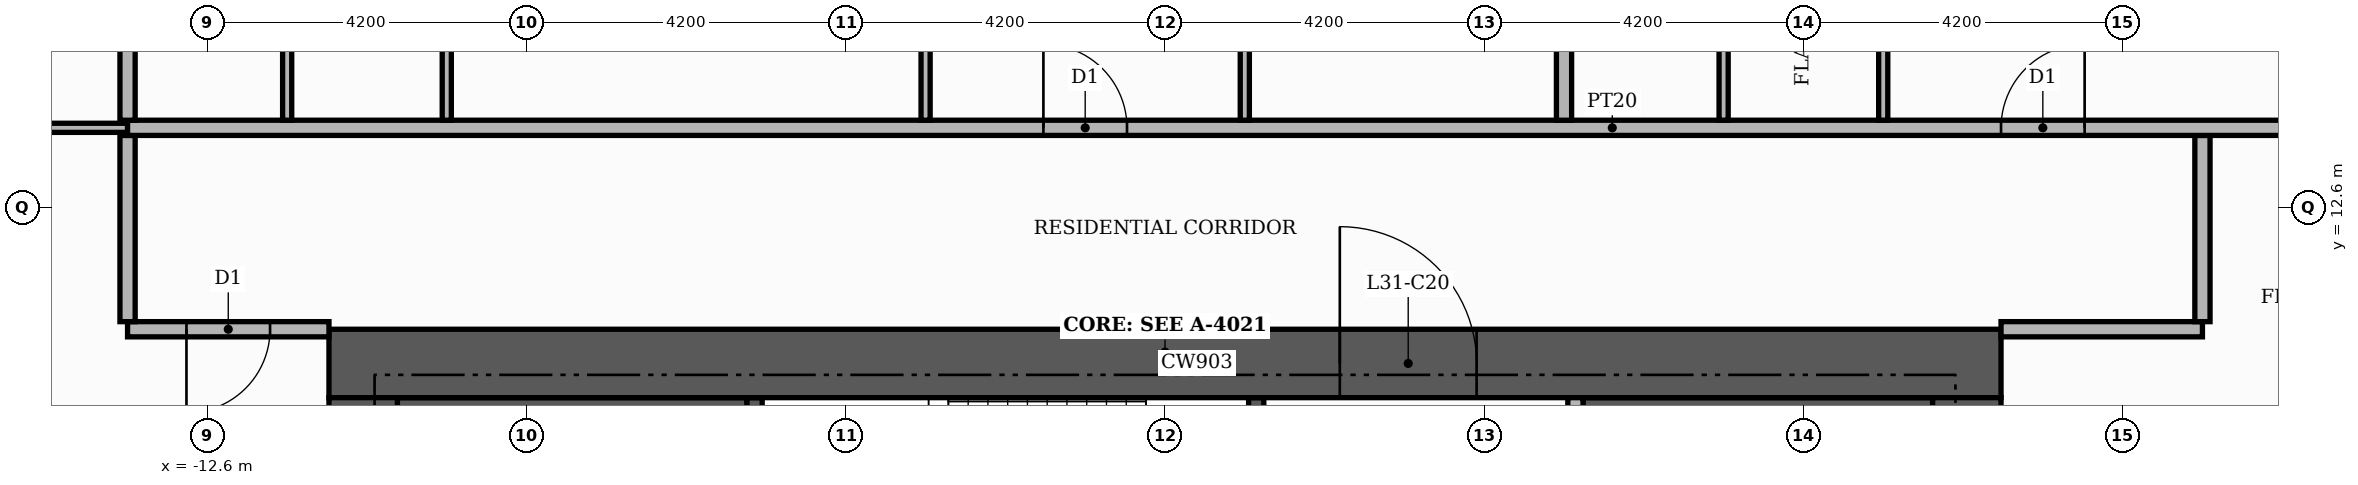
"""IFC4 building model, lengths in metres.
Left out: names, types, materials, properties, quantities, classifications, styles, units other than length and angle.
Written with IfcOpenShell. Run it as: python <this file> out.ifc"""

import sys

from ifc_helpers import new_model, si_unit, direction, frame, frame_2d, origin, place, context, subcontext, project, spatial, rectangle, extrude, element, fill, save


model = new_model("IFC4")
c1 = context("Model", 3, precision=1e-05, world=origin(), true_north=direction((0.0, 1.0)))
c2 = subcontext(c1, "Body", "Model", "MODEL_VIEW")
j1 = project(units=[si_unit("LENGTHUNIT", "METRE"), si_unit("PLANEANGLEUNIT", "RADIAN")], contexts=[c1])
p1 = place(None, origin())
s1 = spatial("IfcSite", under=j1, at=p1, CompositionType="ELEMENT")
p2 = place(p1, origin())
s2 = spatial("IfcBuilding", under=s1, at=p2, CompositionType="ELEMENT")
p3 = place(p2, frame((0.0, 0.0, 133.8)))
s3 = spatial("IfcBuildingStorey", under=s2, at=p3, CompositionType="ELEMENT", Elevation=133.8)
for number, where, z_axis, x_axis in (
    (1, (-10.1, 9.15, 0.0), (0.0, 0.0, 1.0), (1.0, 0.0, 0.0)),
    (2, (5.5, 9.15, 0.0), (0.0, 0.0, 1.0), (1.0, 0.0, 0.0)),
):
    element("IfcWall", number, at=place(p3, frame(where, z_axis=z_axis, x_axis=x_axis)), inside=s3, PredefinedType="SHEAR", context=c2, shape_type="SweptSolid", body=[
        extrude(rectangle(XDim=4.6, YDim=1.9, at=frame_2d((2.3, 0.0))), origin(), (0.0, 0.0, 1.0), 3.48),
    ])
p4 = place(p3, frame((-5.4, 7.25, 0.0), z_axis=(0.0, 0.0, 1.0), x_axis=(0.0, 1.0, 0.0)))
e3 = element("IfcWall", 3, at=p4, inside=s3, PredefinedType="SHEAR", context=c2, shape_type="SweptSolid", body=[
    extrude(rectangle(XDim=2.85, YDim=0.2, at=frame_2d((1.425, 0.0))), origin(), (0.0, 0.0, 1.0), 3.48),
])
p5 = place(p3, frame((1.2, 7.25, 0.0), z_axis=(0.0, 0.0, 1.0), x_axis=(0.0, 1.0, 0.0)))
e4 = element("IfcWall", 4, at=p5, inside=s3, PredefinedType="SHEAR", context=c2, shape_type="SweptSolid", body=[
    extrude(rectangle(XDim=2.85, YDim=0.2, at=frame_2d((1.425, 0.0))), origin(), (0.0, 0.0, 1.0), 3.48),
])
p6 = place(p5, frame((0.85, 0.0, 0.0)))
e5 = element("IfcOpeningElement", 5, at=p6, cuts=e4, PredefinedType="OPENING", context=c2, shape_type="SweptSolid", body=[
    extrude(rectangle(XDim=1.0, YDim=2.1, at=frame_2d((0.5, 1.05))), frame((0.0, 0.11, 0.0), z_axis=(0.0, -1.0, 0.0), x_axis=(1.0, 0.0, 0.0)), (0.0, 0.0, 1.0), 0.22),
])
p7 = place(p3, frame((-11.0, 10.55, 0.0), z_axis=(0.0, 0.0, 1.0), x_axis=(1.0, 0.0, 0.0)))
e6 = element("IfcWall", 6, at=p7, inside=s3, PredefinedType="SHEAR", context=c2, shape_type="SweptSolid", body=[
    extrude(rectangle(XDim=22.0, YDim=0.9, at=frame_2d((11.0, 0.0))), origin(), (0.0, 0.0, 1.0), 3.48),
])
p8 = place(p7, frame((13.3, 0.0, 0.0)))
e7 = element("IfcOpeningElement", 7, at=p8, cuts=e6, PredefinedType="OPENING", context=c2, shape_type="SweptSolid", body=[
    extrude(rectangle(XDim=1.8, YDim=2.2, at=frame_2d((0.9, 1.1))), frame((0.0, 0.46, 0.0), z_axis=(0.0, -1.0, 0.0), x_axis=(1.0, 0.0, 0.0)), (0.0, 0.0, 1.0), 0.92),
])
for number, where, z_axis, x_axis in (
    (8, (-10.55, -10.1, 0.0), (0.0, 0.0, 1.0), (0.0, 1.0, 0.0)),
    (9, (10.55, -10.1, 0.0), (0.0, 0.0, 1.0), (0.0, 1.0, 0.0)),
):
    element("IfcWall", number, at=place(p3, frame(where, z_axis=z_axis, x_axis=x_axis)), inside=s3, PredefinedType="SHEAR", context=c2, shape_type="SweptSolid", body=[
        extrude(rectangle(XDim=20.2, YDim=0.9, at=frame_2d((10.1, 0.0))), origin(), (0.0, 0.0, 1.0), 3.48),
    ])
p9 = place(p3, frame((5.4, 5.5, 0.0), z_axis=(0.0, 0.0, 1.0), x_axis=(0.0, 1.0, 0.0)))
e10 = element("IfcWall", 10, at=p9, inside=s3, PredefinedType="PARTITIONING", context=c2, shape_type="SweptSolid", body=[
    extrude(rectangle(XDim=4.6, YDim=0.2, at=frame_2d((2.3, 0.0))), origin(), (0.0, 0.0, 1.0), 3.48),
])
p10 = place(p9, frame((0.25, 0.0, 0.0)))
e11 = element("IfcOpeningElement", 11, at=p10, cuts=e10, PredefinedType="OPENING", context=c2, shape_type="SweptSolid", body=[
    extrude(rectangle(XDim=1.0, YDim=2.1, at=frame_2d((0.5, 1.05))), frame((0.0, 0.11, 0.0), z_axis=(0.0, -1.0, 0.0), x_axis=(1.0, 0.0, 0.0)), (0.0, 0.0, 1.0), 0.22),
])
p11 = place(p3, frame((-13.65, 11.0, 0.0), z_axis=(0.0, 0.0, 1.0), x_axis=(1.0, 0.0, 0.0)))
e12 = element("IfcWall", 12, at=p11, inside=s3, PredefinedType="PARTITIONING", context=c2, shape_type="SweptSolid", body=[
    extrude(rectangle(XDim=2.65, YDim=0.2, at=frame_2d((1.325, 0.0))), origin(), (0.0, 0.0, 1.0), 3.48),
])
p12 = place(p11, frame((0.775, 0.0, 0.0)))
e13 = element("IfcOpeningElement", 13, at=p12, cuts=e12, PredefinedType="OPENING", context=c2, shape_type="SweptSolid", body=[
    extrude(rectangle(XDim=1.1, YDim=2.4, at=frame_2d((0.55, 1.2))), frame((0.0, 0.11, 0.0), z_axis=(0.0, -1.0, 0.0), x_axis=(1.0, 0.0, 0.0)), (0.0, 0.0, 1.0), 0.22),
])
p13 = place(p3, frame((11.0, 11.0, 0.0), z_axis=(0.0, 0.0, 1.0), x_axis=(1.0, 0.0, 0.0)))
e14 = element("IfcWall", 14, at=p13, inside=s3, PredefinedType="PARTITIONING", context=c2, shape_type="SweptSolid", body=[
    extrude(rectangle(XDim=2.65, YDim=0.2, at=frame_2d((1.325, 0.0))), origin(), (0.0, 0.0, 1.0), 3.48),
])
for number, where, z_axis, x_axis in (
    (15, (-13.65, 11.1, 0.0), (0.0, 0.0, 1.0), (0.0, 1.0, 0.0)),
    (16, (13.65, 11.1, 0.0), (0.0, 0.0, 1.0), (0.0, 1.0, 0.0)),
):
    element("IfcWall", number, at=place(p3, frame(where, z_axis=z_axis, x_axis=x_axis)), inside=s3, PredefinedType="PARTITIONING", context=c2, shape_type="SweptSolid", body=[
        extrude(rectangle(XDim=2.45, YDim=0.2, at=frame_2d((1.225, 0.0))), origin(), (0.0, 0.0, 1.0), 3.48),
    ])
p14 = place(p3, frame((-19.82, 13.65, 0.0), z_axis=(0.0, 0.0, 1.0), x_axis=(1.0, 0.0, 0.0)))
e17 = element("IfcWall", 17, at=p14, inside=s3, PredefinedType="PARTITIONING", context=c2, shape_type="SweptSolid", body=[
    extrude(rectangle(XDim=6.17, YDim=0.12, at=frame_2d((3.085, 0.0))), origin(), (0.0, 0.0, 1.0), 3.48),
])
p15 = place(p14, frame((2.635, 0.0, 0.0)))
e18 = element("IfcOpeningElement", 18, at=p15, cuts=e17, PredefinedType="OPENING", context=c2, shape_type="SweptSolid", body=[
    extrude(rectangle(XDim=0.9, YDim=2.1, at=frame_2d((0.45, 1.05))), frame((0.0, 0.07, 0.0), z_axis=(0.0, -1.0, 0.0), x_axis=(1.0, 0.0, 0.0)), (0.0, 0.0, 1.0), 0.14),
])
p16 = place(p3, frame((-13.65, 13.65, 0.0), z_axis=(0.0, 0.0, 1.0), x_axis=(1.0, 0.0, 0.0)))
e19 = element("IfcWall", 19, at=p16, inside=s3, PredefinedType="PARTITIONING", context=c2, shape_type="SweptSolid", body=[
    extrude(rectangle(XDim=39.07, YDim=0.2, at=frame_2d((19.535, 0.0))), origin(), (0.0, 0.0, 1.0), 3.48),
])
p17 = place(p16, frame((24.65, 0.0, 0.0)))
e20 = element("IfcOpeningElement", 20, at=p17, cuts=e19, PredefinedType="OPENING", context=c2, shape_type="SweptSolid", body=[
    extrude(rectangle(XDim=1.1, YDim=2.4, at=frame_2d((0.55, 1.2))), frame((0.0, 0.11, 0.0), z_axis=(0.0, -1.0, 0.0), x_axis=(1.0, 0.0, 0.0)), (0.0, 0.0, 1.0), 0.22),
])
p18 = place(p16, frame((12.05, 0.0, 0.0)))
e21 = element("IfcOpeningElement", 21, at=p18, cuts=e19, PredefinedType="OPENING", context=c2, shape_type="SweptSolid", body=[
    extrude(rectangle(XDim=1.1, YDim=2.4, at=frame_2d((0.55, 1.2))), frame((0.0, 0.11, 0.0), z_axis=(0.0, -1.0, 0.0), x_axis=(1.0, 0.0, 0.0)), (0.0, 0.0, 1.0), 0.22),
])
p19 = place(p3, frame((-13.65, 13.75, 0.0), z_axis=(0.0, 0.0, 1.0), x_axis=(0.0, 1.0, 0.0)))
e22 = element("IfcWall", 22, at=p19, inside=s3, PredefinedType="PARTITIONING", context=c2, shape_type="SweptSolid", body=[
    extrude(rectangle(XDim=11.67, YDim=0.2, at=frame_2d((5.835, 0.0))), origin(), (0.0, 0.0, 1.0), 3.48),
])
for number, where, z_axis, x_axis in (
    (23, (-11.55, 13.75, 0.0), (0.0, 0.0, 1.0), (0.0, 1.0, 0.0)),
    (24, (-9.45, 13.75, 0.0), (0.0, 0.0, 1.0), (0.0, 1.0, 0.0)),
    (25, (-3.15, 13.75, 0.0), (0.0, 0.0, 1.0), (0.0, 1.0, 0.0)),
):
    element("IfcWall", number, at=place(p3, frame(where, z_axis=z_axis, x_axis=x_axis)), inside=s3, PredefinedType="PARTITIONING", context=c2, shape_type="SweptSolid", body=[
        extrude(rectangle(XDim=5.41, YDim=0.12, at=frame_2d((2.705, 0.0))), origin(), (0.0, 0.0, 1.0), 3.48),
    ])
p20 = place(p3, frame((1.05, 13.75, 0.0), z_axis=(0.0, 0.0, 1.0), x_axis=(0.0, 1.0, 0.0)))
e26 = element("IfcWall", 26, at=p20, inside=s3, PredefinedType="PARTITIONING", context=c2, shape_type="SweptSolid", body=[
    extrude(rectangle(XDim=5.41, YDim=0.12, at=frame_2d((2.705, 0.0))), origin(), (0.0, 0.0, 1.0), 3.48),
])
p21 = place(p20, frame((2.185, 0.0, 0.0)))
e27 = element("IfcOpeningElement", 27, at=p21, cuts=e26, PredefinedType="OPENING", context=c2, shape_type="SweptSolid", body=[
    extrude(rectangle(XDim=1.0, YDim=2.1, at=frame_2d((0.5, 1.05))), frame((0.0, 0.07, 0.0), z_axis=(0.0, -1.0, 0.0), x_axis=(1.0, 0.0, 0.0)), (0.0, 0.0, 1.0), 0.14),
])
p22 = place(p3, frame((5.25, 13.75, 0.0), z_axis=(0.0, 0.0, 1.0), x_axis=(0.0, 1.0, 0.0)))
e28 = element("IfcWall", 28, at=p22, inside=s3, PredefinedType="PARTITIONING", context=c2, shape_type="SweptSolid", body=[
    extrude(rectangle(XDim=11.67, YDim=0.2, at=frame_2d((5.835, 0.0))), origin(), (0.0, 0.0, 1.0), 3.48),
])
p23 = place(p3, frame((7.35, 13.75, 0.0), z_axis=(0.0, 0.0, 1.0), x_axis=(0.0, 1.0, 0.0)))
e29 = element("IfcWall", 29, at=p23, inside=s3, PredefinedType="PARTITIONING", context=c2, shape_type="SweptSolid", body=[
    extrude(rectangle(XDim=5.11, YDim=0.12, at=frame_2d((2.555, 0.0))), origin(), (0.0, 0.0, 1.0), 3.48),
])
p24 = place(p3, frame((9.45, 13.75, 0.0), z_axis=(0.0, 0.0, 1.0), x_axis=(0.0, 1.0, 0.0)))
e30 = element("IfcWall", 30, at=p24, inside=s3, PredefinedType="PARTITIONING", context=c2, shape_type="SweptSolid", body=[
    extrude(rectangle(XDim=5.11, YDim=0.12, at=frame_2d((2.555, 0.0))), origin(), (0.0, 0.0, 1.0), 3.48),
])
p25 = place(p24, frame((2.085, 0.0, 0.0)))
e31 = element("IfcOpeningElement", 31, at=p25, cuts=e30, PredefinedType="OPENING", context=c2, shape_type="SweptSolid", body=[
    extrude(rectangle(XDim=0.9, YDim=2.1, at=frame_2d((0.45, 1.05))), frame((0.0, 0.07, 0.0), z_axis=(0.0, -1.0, 0.0), x_axis=(1.0, 0.0, 0.0)), (0.0, 0.0, 1.0), 0.14),
])
p26 = place(p8, origin())
e32 = element("IfcDoor", 32, at=p26, inside=s3, OperationType="DOUBLE_DOOR_SINGLE_SWING", PredefinedType="DOOR", context=c2, shape_type="SweptSolid", body=[
    extrude(rectangle(XDim=1.8, YDim=2.2, at=frame_2d((0.9, 1.1))), frame((0.0, 0.025, 0.0), z_axis=(0.0, -1.0, 0.0), x_axis=(1.0, 0.0, 0.0)), (0.0, 0.0, 1.0), 0.05),
])
fill(e7, e32)
p27 = place(p17, origin())
e33 = element("IfcDoor", 33, at=p27, inside=s3, OperationType="SINGLE_SWING_RIGHT", PredefinedType="DOOR", context=c2, shape_type="SweptSolid", body=[
    extrude(rectangle(XDim=1.1, YDim=2.4, at=frame_2d((0.55, 1.2))), frame((0.0, 0.025, 0.0), z_axis=(0.0, -1.0, 0.0), x_axis=(1.0, 0.0, 0.0)), (0.0, 0.0, 1.0), 0.05),
])
fill(e20, e33)
p28 = place(p18, origin())
e34 = element("IfcDoor", 34, at=p28, inside=s3, OperationType="SINGLE_SWING_LEFT", PredefinedType="DOOR", context=c2, shape_type="SweptSolid", body=[
    extrude(rectangle(XDim=1.1, YDim=2.4, at=frame_2d((0.55, 1.2))), frame((0.0, 0.025, 0.0), z_axis=(0.0, -1.0, 0.0), x_axis=(1.0, 0.0, 0.0)), (0.0, 0.0, 1.0), 0.05),
])
fill(e21, e34)
p29 = place(p12, frame((1.1, 0.0, 0.0), z_axis=(0.0, 0.0, 1.0), x_axis=(-1.0, 0.0, 0.0)))
e35 = element("IfcDoor", 35, at=p29, inside=s3, OperationType="SINGLE_SWING_LEFT", PredefinedType="DOOR", context=c2, shape_type="SweptSolid", body=[
    extrude(rectangle(XDim=1.1, YDim=2.4, at=frame_2d((0.55, 1.2))), frame((0.0, 0.025, 0.0), z_axis=(0.0, -1.0, 0.0), x_axis=(1.0, 0.0, 0.0)), (0.0, 0.0, 1.0), 0.05),
])
fill(e13, e35)
save(model, sys.argv[1])
